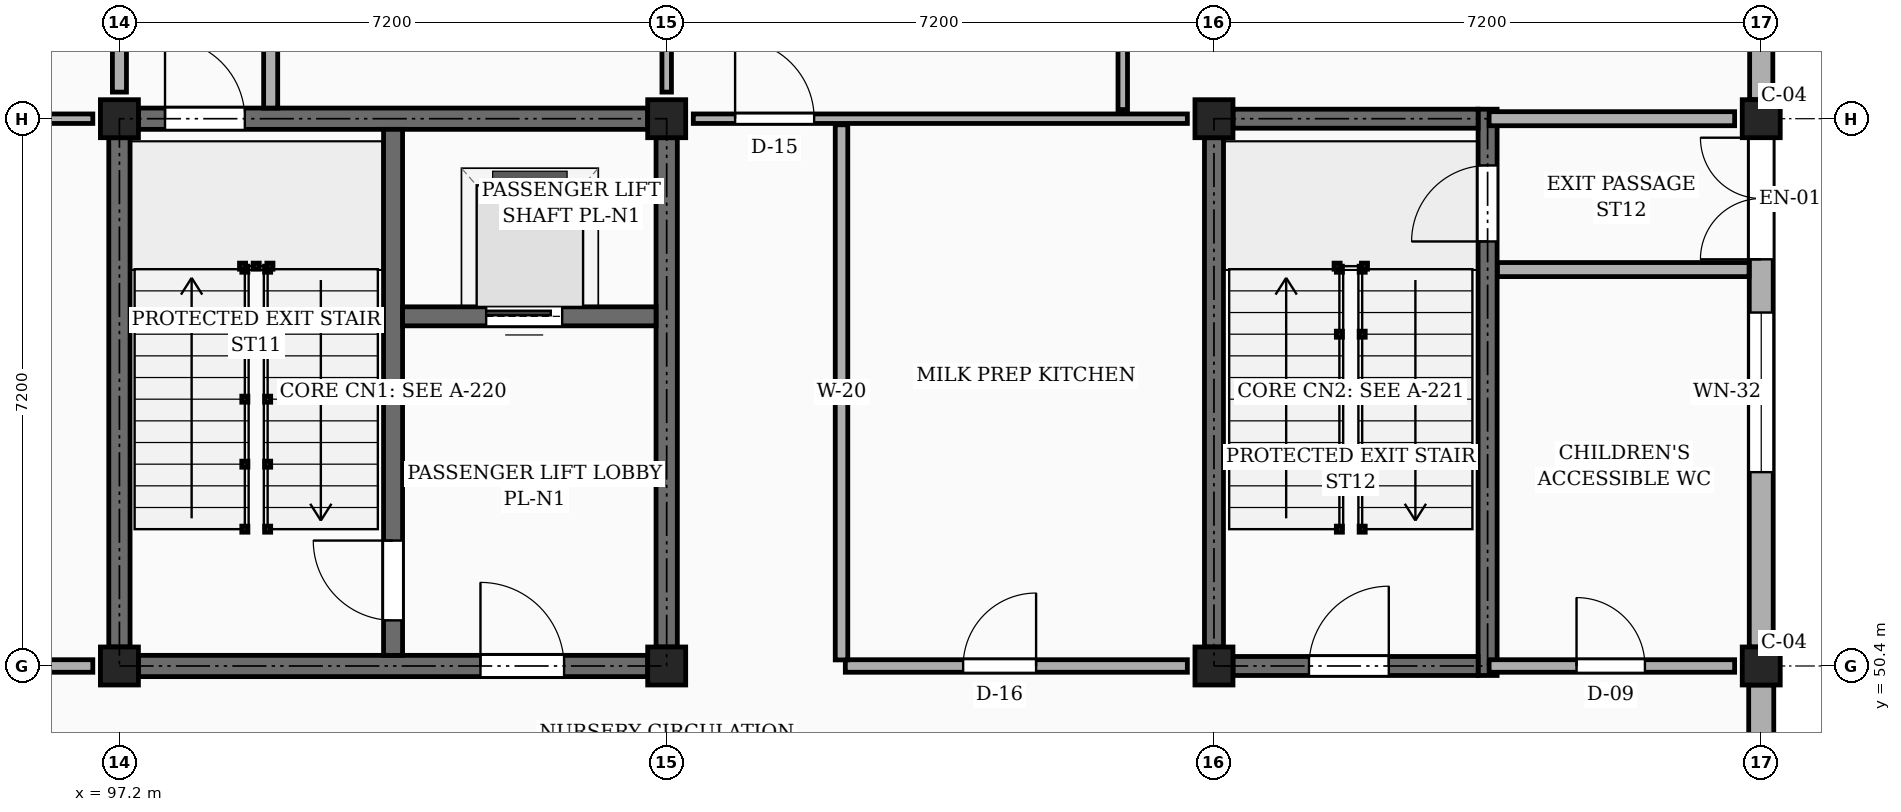
"""IFC4 building model, lengths in metres.
Left out: names, types, materials, properties, quantities, classifications, styles, units other than length and angle.
Written with IfcOpenShell. Run it as: python <this file> out.ifc"""

import sys

from ifc_helpers import new_model, si_unit, direction, frame, frame_2d, origin, origin_2d, place, context, subcontext, project, spatial, rectangle, extrude, element, fill, save


model = new_model("IFC4")
c1 = context("Model", 3, precision=1e-05, world=origin(), true_north=direction((0.0, 1.0)))
c2 = subcontext(c1, "Body", "Model", "MODEL_VIEW")
j1 = project(units=[si_unit("LENGTHUNIT", "METRE"), si_unit("PLANEANGLEUNIT", "RADIAN")], contexts=[c1])
p1 = place(None, origin())
s1 = spatial("IfcSite", under=j1, at=p1, CompositionType="ELEMENT")
p2 = place(p1, origin())
s2 = spatial("IfcBuilding", under=s1, at=p2, CompositionType="ELEMENT")
p3 = place(p2, origin())
s3 = spatial("IfcBuildingStorey", under=s2, at=p3, CompositionType="ELEMENT", Elevation=0.0)
for number, where, z_axis, x_axis in (
    (1, (97.2, 50.4, 0.0), (0.0, 0.0, 1.0), (1.0, 0.0, 0.0)),
    (2, (97.2, 57.6, 0.0), (0.0, 0.0, 1.0), (1.0, 0.0, 0.0)),
    (3, (104.4, 50.4, 0.0), (0.0, 0.0, 1.0), (1.0, 0.0, 0.0)),
    (4, (104.4, 57.6, 0.0), (0.0, 0.0, 1.0), (1.0, 0.0, 0.0)),
    (5, (111.6, 50.4, 0.0), (0.0, 0.0, 1.0), (1.0, 0.0, 0.0)),
    (6, (111.6, 57.6, 0.0), (0.0, 0.0, 1.0), (1.0, 0.0, 0.0)),
    (7, (118.8, 50.4, 0.0), (0.0, 0.0, 1.0), (1.0, 0.0, 0.0)),
    (8, (118.8, 57.6, 0.0), (0.0, 0.0, 1.0), (1.0, 0.0, 0.0)),
):
    element("IfcColumn", number, at=place(p3, frame(where, z_axis=z_axis, x_axis=x_axis)), inside=s3, PredefinedType="COLUMN", context=c2, shape_type="SweptSolid", body=[
        extrude(rectangle(XDim=0.5, YDim=0.5, at=origin_2d()), origin(), (0.0, 0.0, 1.0), 4.5),
    ])
p4 = place(p3, frame((118.8, 43.44, 0.0), z_axis=(0.0, 0.0, 1.0), x_axis=(0.0, 1.0, 0.0)))
e9 = element("IfcWall", 9, at=p4, inside=s3, PredefinedType="SOLIDWALL", context=c2, shape_type="SweptSolid", body=[
    extrude(rectangle(XDim=6.71, YDim=0.33, at=frame_2d((3.355, 0.0))), origin(), (0.0, 0.0, 1.0), 3.83),
])
p5 = place(p4, frame((1.375, 0.0, 0.85)))
e10 = element("IfcOpeningElement", 10, at=p5, cuts=e9, PredefinedType="OPENING", context=c2, shape_type="SweptSolid", body=[
    extrude(rectangle(XDim=1.8, YDim=2.1, at=frame_2d((0.9, 1.05))), frame((0.0, 0.175, 0.0), z_axis=(0.0, -1.0, 0.0), x_axis=(1.0, 0.0, 0.0)), (0.0, 0.0, 1.0), 0.35),
])
p6 = place(p3, frame((118.8, 50.65, 0.0), z_axis=(0.0, 0.0, 1.0), x_axis=(0.0, 1.0, 0.0)))
e11 = element("IfcWall", 11, at=p6, inside=s3, PredefinedType="SOLIDWALL", context=c2, shape_type="SweptSolid", body=[
    extrude(rectangle(XDim=6.7, YDim=0.315, at=frame_2d((3.35, 0.0))), origin(), (0.0, 0.0, 1.0), 3.83),
])
p7 = place(p6, frame((2.3, 0.0, 0.85)))
e12 = element("IfcOpeningElement", 12, at=p7, cuts=e11, PredefinedType="OPENING", context=c2, shape_type="SweptSolid", body=[
    extrude(rectangle(XDim=2.1, YDim=2.1, at=frame_2d((1.05, 1.05))), frame((0.0, 0.167, 0.0), z_axis=(0.0, -1.0, 0.0), x_axis=(1.0, 0.0, 0.0)), (0.0, 0.0, 1.0), 0.335),
])
p8 = place(p6, frame((5.1, 0.0, 0.0)))
e13 = element("IfcOpeningElement", 13, at=p8, cuts=e11, PredefinedType="OPENING", context=c2, shape_type="SweptSolid", body=[
    extrude(rectangle(XDim=1.6, YDim=2.25, at=frame_2d((0.8, 1.125))), frame((0.0, 0.167, 0.0), z_axis=(0.0, -1.0, 0.0), x_axis=(1.0, 0.0, 0.0)), (0.0, 0.0, 1.0), 0.335),
])
p9 = place(p3, frame((118.8, 57.85, 0.0), z_axis=(0.0, 0.0, 1.0), x_axis=(0.0, 1.0, 0.0)))
e14 = element("IfcWall", 14, at=p9, inside=s3, PredefinedType="SOLIDWALL", context=c2, shape_type="SweptSolid", body=[
    extrude(rectangle(XDim=6.71, YDim=0.305, at=frame_2d((3.355, 0.0))), origin(), (0.0, 0.0, 1.0), 3.83),
])
p10 = place(p9, frame((2.455, 0.0, 0.85)))
e15 = element("IfcOpeningElement", 15, at=p10, cuts=e14, PredefinedType="OPENING", context=c2, shape_type="SweptSolid", body=[
    extrude(rectangle(XDim=1.8, YDim=2.1, at=frame_2d((0.9, 1.05))), frame((0.0, 0.163, 0.0), z_axis=(0.0, -1.0, 0.0), x_axis=(1.0, 0.0, 0.0)), (0.0, 0.0, 1.0), 0.325),
])
p11 = place(p3, frame((97.2, 50.65, 0.0), z_axis=(0.0, 0.0, 1.0), x_axis=(0.0, 1.0, 0.0)))
e16 = element("IfcWall", 16, at=p11, inside=s3, PredefinedType="SHEAR", context=c2, shape_type="SweptSolid", body=[
    extrude(rectangle(XDim=6.7, YDim=0.28, at=frame_2d((3.35, 0.0))), origin(), (0.0, 0.0, 1.0), 4.26),
])
p12 = place(p3, frame((97.45, 57.6, 0.0), z_axis=(0.0, 0.0, 1.0), x_axis=(1.0, 0.0, 0.0)))
e17 = element("IfcWall", 17, at=p12, inside=s3, PredefinedType="SHEAR", context=c2, shape_type="SweptSolid", body=[
    extrude(rectangle(XDim=6.7, YDim=0.28, at=frame_2d((3.35, 0.0))), origin(), (0.0, 0.0, 1.0), 4.26),
])
p13 = place(p12, frame((0.35, 0.0, 0.0)))
e18 = element("IfcOpeningElement", 18, at=p13, cuts=e17, PredefinedType="OPENING", context=c2, shape_type="SweptSolid", body=[
    extrude(rectangle(XDim=1.05, YDim=2.15, at=frame_2d((0.525, 1.075))), frame((0.0, 0.15, 0.0), z_axis=(0.0, -1.0, 0.0), x_axis=(1.0, 0.0, 0.0)), (0.0, 0.0, 1.0), 0.3),
])
p14 = place(p3, frame((104.4, 50.65, 0.0), z_axis=(0.0, 0.0, 1.0), x_axis=(0.0, 1.0, 0.0)))
e19 = element("IfcWall", 19, at=p14, inside=s3, PredefinedType="SHEAR", context=c2, shape_type="SweptSolid", body=[
    extrude(rectangle(XDim=6.7, YDim=0.28, at=frame_2d((3.35, 0.0))), origin(), (0.0, 0.0, 1.0), 4.26),
])
p15 = place(p3, frame((97.45, 50.4, 0.0), z_axis=(0.0, 0.0, 1.0), x_axis=(1.0, 0.0, 0.0)))
e20 = element("IfcWall", 20, at=p15, inside=s3, PredefinedType="SHEAR", context=c2, shape_type="SweptSolid", body=[
    extrude(rectangle(XDim=6.7, YDim=0.28, at=frame_2d((3.35, 0.0))), origin(), (0.0, 0.0, 1.0), 4.26),
])
p16 = place(p15, frame((4.5, 0.0, 0.0)))
e21 = element("IfcOpeningElement", 21, at=p16, cuts=e20, PredefinedType="OPENING", context=c2, shape_type="SweptSolid", body=[
    extrude(rectangle(XDim=1.1, YDim=2.15, at=frame_2d((0.55, 1.075))), frame((0.0, 0.15, 0.0), z_axis=(0.0, -1.0, 0.0), x_axis=(1.0, 0.0, 0.0)), (0.0, 0.0, 1.0), 0.3),
])
p17 = place(p3, frame((100.8, 50.54, 0.0), z_axis=(0.0, 0.0, 1.0), x_axis=(0.0, 1.0, 0.0)))
e22 = element("IfcWall", 22, at=p17, inside=s3, PredefinedType="SHEAR", context=c2, shape_type="SweptSolid", body=[
    extrude(rectangle(XDim=6.92, YDim=0.25, at=frame_2d((3.46, 0.0))), origin(), (0.0, 0.0, 1.0), 4.26),
])
p18 = place(p17, frame((0.46, 0.0, 0.0)))
e23 = element("IfcOpeningElement", 23, at=p18, cuts=e22, PredefinedType="OPENING", context=c2, shape_type="SweptSolid", body=[
    extrude(rectangle(XDim=1.05, YDim=2.15, at=frame_2d((0.525, 1.075))), frame((0.0, 0.135, 0.0), z_axis=(0.0, -1.0, 0.0), x_axis=(1.0, 0.0, 0.0)), (0.0, 0.0, 1.0), 0.27),
])
p19 = place(p3, frame((100.925, 55.0, 0.0), z_axis=(0.0, 0.0, 1.0), x_axis=(1.0, 0.0, 0.0)))
e24 = element("IfcWall", 24, at=p19, inside=s3, PredefinedType="SHEAR", context=c2, shape_type="SweptSolid", body=[
    extrude(rectangle(XDim=3.335, YDim=0.25, at=frame_2d((1.667, 0.0))), origin(), (0.0, 0.0, 1.0), 4.26),
])
p20 = place(p19, frame((1.1, 0.0, 0.0)))
e25 = element("IfcOpeningElement", 25, at=p20, cuts=e24, PredefinedType="OPENING", context=c2, shape_type="SweptSolid", body=[
    extrude(rectangle(XDim=1.0, YDim=2.2, at=frame_2d((0.5, 1.1))), frame((0.0, 0.135, 0.0), z_axis=(0.0, -1.0, 0.0), x_axis=(1.0, 0.0, 0.0)), (0.0, 0.0, 1.0), 0.27),
])
p21 = place(p3, frame((111.6, 50.65, 0.0), z_axis=(0.0, 0.0, 1.0), x_axis=(0.0, 1.0, 0.0)))
e26 = element("IfcWall", 26, at=p21, inside=s3, PredefinedType="SHEAR", context=c2, shape_type="SweptSolid", body=[
    extrude(rectangle(XDim=6.7, YDim=0.25, at=frame_2d((3.35, 0.0))), origin(), (0.0, 0.0, 1.0), 4.26),
])
p22 = place(p3, frame((115.2, 50.275, 0.0), z_axis=(0.0, 0.0, 1.0), x_axis=(0.0, 1.0, 0.0)))
e27 = element("IfcWall", 27, at=p22, inside=s3, PredefinedType="SHEAR", context=c2, shape_type="SweptSolid", body=[
    extrude(rectangle(XDim=7.45, YDim=0.25, at=frame_2d((3.725, 0.0))), origin(), (0.0, 0.0, 1.0), 4.26),
])
p23 = place(p22, frame((5.71, 0.0, 0.0)))
e28 = element("IfcOpeningElement", 28, at=p23, cuts=e27, PredefinedType="OPENING", context=c2, shape_type="SweptSolid", body=[
    extrude(rectangle(XDim=1.0, YDim=2.15, at=frame_2d((0.5, 1.075))), frame((0.0, 0.135, 0.0), z_axis=(0.0, -1.0, 0.0), x_axis=(1.0, 0.0, 0.0)), (0.0, 0.0, 1.0), 0.27),
])
p24 = place(p3, frame((111.85, 57.6, 0.0), z_axis=(0.0, 0.0, 1.0), x_axis=(1.0, 0.0, 0.0)))
e29 = element("IfcWall", 29, at=p24, inside=s3, PredefinedType="SHEAR", context=c2, shape_type="SweptSolid", body=[
    extrude(rectangle(XDim=3.225, YDim=0.25, at=frame_2d((1.612, 0.0))), origin(), (0.0, 0.0, 1.0), 4.26),
])
p25 = place(p3, frame((111.85, 50.4, 0.0), z_axis=(0.0, 0.0, 1.0), x_axis=(1.0, 0.0, 0.0)))
e30 = element("IfcWall", 30, at=p25, inside=s3, PredefinedType="SHEAR", context=c2, shape_type="SweptSolid", body=[
    extrude(rectangle(XDim=3.225, YDim=0.25, at=frame_2d((1.612, 0.0))), origin(), (0.0, 0.0, 1.0), 4.26),
])
p26 = place(p25, frame((1.0, 0.0, 0.0)))
e31 = element("IfcOpeningElement", 31, at=p26, cuts=e30, PredefinedType="OPENING", context=c2, shape_type="SweptSolid", body=[
    extrude(rectangle(XDim=1.05, YDim=2.15, at=frame_2d((0.525, 1.075))), frame((0.0, 0.135, 0.0), z_axis=(0.0, -1.0, 0.0), x_axis=(1.0, 0.0, 0.0)), (0.0, 0.0, 1.0), 0.27),
])
p27 = place(p3, frame((90.35, 50.4, 0.0), z_axis=(0.0, 0.0, 1.0), x_axis=(1.0, 0.0, 0.0)))
e32 = element("IfcWall", 32, at=p27, inside=s3, PredefinedType="PARTITIONING", context=c2, shape_type="SweptSolid", body=[
    extrude(rectangle(XDim=6.5, YDim=0.165, at=frame_2d((3.25, 0.0))), origin(), (0.0, 0.0, 1.0), 3.41),
])
p28 = place(p27, frame((2.4, 0.0, 0.0)))
e33 = element("IfcOpeningElement", 33, at=p28, cuts=e32, PredefinedType="OPENING", context=c2, shape_type="SweptSolid", body=[
    extrude(rectangle(XDim=0.96, YDim=2.1, at=frame_2d((0.48, 1.05))), frame((0.0, 0.093, 0.0), z_axis=(0.0, -1.0, 0.0), x_axis=(1.0, 0.0, 0.0)), (0.0, 0.0, 1.0), 0.185),
])
p29 = place(p3, frame((106.75, 50.4, 0.0), z_axis=(0.0, 0.0, 1.0), x_axis=(1.0, 0.0, 0.0)))
e34 = element("IfcWall", 34, at=p29, inside=s3, PredefinedType="PARTITIONING", context=c2, shape_type="SweptSolid", body=[
    extrude(rectangle(XDim=4.5, YDim=0.165, at=frame_2d((2.25, 0.0))), origin(), (0.0, 0.0, 1.0), 3.41),
])
p30 = place(p29, frame((1.55, 0.0, 0.0)))
e35 = element("IfcOpeningElement", 35, at=p30, cuts=e34, PredefinedType="OPENING", context=c2, shape_type="SweptSolid", body=[
    extrude(rectangle(XDim=0.96, YDim=2.1, at=frame_2d((0.48, 1.05))), frame((0.0, 0.093, 0.0), z_axis=(0.0, -1.0, 0.0), x_axis=(1.0, 0.0, 0.0)), (0.0, 0.0, 1.0), 0.185),
])
p31 = place(p3, frame((115.22, 50.4, 0.0), z_axis=(0.0, 0.0, 1.0), x_axis=(1.0, 0.0, 0.0)))
e36 = element("IfcWall", 36, at=p31, inside=s3, PredefinedType="PARTITIONING", context=c2, shape_type="SweptSolid", body=[
    extrude(rectangle(XDim=3.23, YDim=0.165, at=frame_2d((1.615, 0.0))), origin(), (0.0, 0.0, 1.0), 3.41),
])
p32 = place(p31, frame((1.15, 0.0, 0.0)))
e37 = element("IfcOpeningElement", 37, at=p32, cuts=e36, PredefinedType="OPENING", context=c2, shape_type="SweptSolid", body=[
    extrude(rectangle(XDim=0.9, YDim=2.05, at=frame_2d((0.45, 1.025))), frame((0.0, 0.093, 0.0), z_axis=(0.0, -1.0, 0.0), x_axis=(1.0, 0.0, 0.0)), (0.0, 0.0, 1.0), 0.185),
])
p33 = place(p3, frame((106.7, 50.48, 0.0), z_axis=(0.0, 0.0, 1.0), x_axis=(0.0, 1.0, 0.0)))
e38 = element("IfcWall", 38, at=p33, inside=s3, PredefinedType="PARTITIONING", context=c2, shape_type="SweptSolid", body=[
    extrude(rectangle(XDim=7.04, YDim=0.165, at=frame_2d((3.52, 0.0))), origin(), (0.0, 0.0, 1.0), 3.41),
])
p34 = place(p3, frame((90.35, 57.6, 0.0), z_axis=(0.0, 0.0, 1.0), x_axis=(1.0, 0.0, 0.0)))
e39 = element("IfcWall", 39, at=p34, inside=s3, PredefinedType="PARTITIONING", context=c2, shape_type="SweptSolid", body=[
    extrude(rectangle(XDim=6.5, YDim=0.125, at=frame_2d((3.25, 0.0))), origin(), (0.0, 0.0, 1.0), 3.41),
])
p35 = place(p34, frame((2.4, 0.0, 0.0)))
e40 = element("IfcOpeningElement", 40, at=p35, cuts=e39, PredefinedType="OPENING", context=c2, shape_type="SweptSolid", body=[
    extrude(rectangle(XDim=0.96, YDim=2.1, at=frame_2d((0.48, 1.05))), frame((0.0, 0.073, 0.0), z_axis=(0.0, -1.0, 0.0), x_axis=(1.0, 0.0, 0.0)), (0.0, 0.0, 1.0), 0.145),
])
p36 = place(p3, frame((104.75, 57.6, 0.0), z_axis=(0.0, 0.0, 1.0), x_axis=(1.0, 0.0, 0.0)))
e41 = element("IfcWall", 41, at=p36, inside=s3, PredefinedType="PARTITIONING", context=c2, shape_type="SweptSolid", body=[
    extrude(rectangle(XDim=6.5, YDim=0.125, at=frame_2d((3.25, 0.0))), origin(), (0.0, 0.0, 1.0), 3.41),
])
p37 = place(p36, frame((0.55, 0.0, 0.0)))
e42 = element("IfcOpeningElement", 42, at=p37, cuts=e41, PredefinedType="OPENING", context=c2, shape_type="SweptSolid", body=[
    extrude(rectangle(XDim=1.04, YDim=2.12, at=frame_2d((0.52, 1.06))), frame((0.0, 0.073, 0.0), z_axis=(0.0, -1.0, 0.0), x_axis=(1.0, 0.0, 0.0)), (0.0, 0.0, 1.0), 0.145),
])
p38 = place(p3, frame((115.22, 57.6, 0.0), z_axis=(0.0, 0.0, 1.0), x_axis=(1.0, 0.0, 0.0)))
e43 = element("IfcWall", 43, at=p38, inside=s3, PredefinedType="PARTITIONING", context=c2, shape_type="SweptSolid", body=[
    extrude(rectangle(XDim=3.23, YDim=0.185, at=frame_2d((1.615, 0.0))), origin(), (0.0, 0.0, 1.0), 3.41),
])
p39 = place(p3, frame((97.2, 57.95, 0.0), z_axis=(0.0, 0.0, 1.0), x_axis=(0.0, 1.0, 0.0)))
e44 = element("IfcWall", 44, at=p39, inside=s3, PredefinedType="PARTITIONING", context=c2, shape_type="SweptSolid", body=[
    extrude(rectangle(XDim=6.5, YDim=0.185, at=frame_2d((3.25, 0.0))), origin(), (0.0, 0.0, 1.0), 3.41),
])
p40 = place(p3, frame((104.4, 57.95, 0.0), z_axis=(0.0, 0.0, 1.0), x_axis=(0.0, 1.0, 0.0)))
e45 = element("IfcWall", 45, at=p40, inside=s3, PredefinedType="PARTITIONING", context=c2, shape_type="SweptSolid", body=[
    extrude(rectangle(XDim=6.5, YDim=0.125, at=frame_2d((3.25, 0.0))), origin(), (0.0, 0.0, 1.0), 3.41),
])
p41 = place(p40, frame((2.4, 0.0, 0.0)))
e46 = element("IfcOpeningElement", 46, at=p41, cuts=e45, PredefinedType="OPENING", context=c2, shape_type="SweptSolid", body=[
    extrude(rectangle(XDim=0.96, YDim=2.1, at=frame_2d((0.48, 1.05))), frame((0.0, 0.073, 0.0), z_axis=(0.0, -1.0, 0.0), x_axis=(1.0, 0.0, 0.0)), (0.0, 0.0, 1.0), 0.145),
])
p42 = place(p3, frame((110.4, 57.72, 0.0), z_axis=(0.0, 0.0, 1.0), x_axis=(0.0, 1.0, 0.0)))
e47 = element("IfcWall", 47, at=p42, inside=s3, PredefinedType="PARTITIONING", context=c2, shape_type="SweptSolid", body=[
    extrude(rectangle(XDim=6.905, YDim=0.125, at=frame_2d((3.453, 0.0))), origin(), (0.0, 0.0, 1.0), 3.41),
])
p43 = place(p42, frame((2.4, 0.0, 0.0)))
e48 = element("IfcOpeningElement", 48, at=p43, cuts=e47, PredefinedType="OPENING", context=c2, shape_type="SweptSolid", body=[
    extrude(rectangle(XDim=0.96, YDim=2.1, at=frame_2d((0.48, 1.05))), frame((0.0, 0.073, 0.0), z_axis=(0.0, -1.0, 0.0), x_axis=(1.0, 0.0, 0.0)), (0.0, 0.0, 1.0), 0.145),
])
p44 = place(p3, frame((99.19, 57.74, 0.0), z_axis=(0.0, 0.0, 1.0), x_axis=(0.0, 1.0, 0.0)))
e49 = element("IfcWall", 49, at=p44, inside=s3, PredefinedType="PARTITIONING", context=c2, shape_type="SweptSolid", body=[
    extrude(rectangle(XDim=6.9, YDim=0.185, at=frame_2d((3.45, 0.0))), origin(), (0.0, 0.0, 1.0), 3.41),
])
p45 = place(p3, frame((115.33, 55.615, 0.0), z_axis=(0.0, 0.0, 1.0), x_axis=(1.0, 0.0, 0.0)))
e50 = element("IfcWall", 50, at=p45, inside=s3, PredefinedType="PARTITIONING", context=c2, shape_type="SweptSolid", body=[
    extrude(rectangle(XDim=3.31, YDim=0.185, at=frame_2d((1.655, 0.0))), origin(), (0.0, 0.0, 1.0), 3.41),
])
p46 = place(p7, origin())
e51 = element("IfcWindow", 51, at=p46, inside=s3, PartitioningType="SINGLE_PANEL", PredefinedType="WINDOW", context=c2, shape_type="SweptSolid", body=[
    extrude(rectangle(XDim=2.1, YDim=2.1, at=frame_2d((1.05, 1.05))), frame((0.0, 0.03, 0.0), z_axis=(0.0, -1.0, 0.0), x_axis=(1.0, 0.0, 0.0)), (0.0, 0.0, 1.0), 0.06),
])
fill(e12, e51)
p47 = place(p16, frame((1.1, 0.0, 0.0), z_axis=(0.0, 0.0, 1.0), x_axis=(-1.0, 0.0, 0.0)))
e52 = element("IfcDoor", 52, at=p47, inside=s3, OperationType="SINGLE_SWING_LEFT", PredefinedType="DOOR", context=c2, shape_type="SweptSolid", body=[
    extrude(rectangle(XDim=1.1, YDim=2.15, at=frame_2d((0.55, 1.075))), frame((0.0, 0.025, 0.0), z_axis=(0.0, -1.0, 0.0), x_axis=(1.0, 0.0, 0.0)), (0.0, 0.0, 1.0), 0.05),
])
fill(e21, e52)
p48 = place(p18, frame((1.05, 0.0, 0.0), z_axis=(0.0, 0.0, 1.0), x_axis=(-1.0, 0.0, 0.0)))
e53 = element("IfcDoor", 53, at=p48, inside=s3, OperationType="SINGLE_SWING_RIGHT", PredefinedType="DOOR", context=c2, shape_type="SweptSolid", body=[
    extrude(rectangle(XDim=1.05, YDim=2.15, at=frame_2d((0.525, 1.075))), frame((0.0, 0.025, 0.0), z_axis=(0.0, -1.0, 0.0), x_axis=(1.0, 0.0, 0.0)), (0.0, 0.0, 1.0), 0.05),
])
fill(e23, e53)
p49 = place(p20, origin())
e54 = element("IfcDoor", 54, at=p49, inside=s3, OperationType="SLIDING_TO_LEFT", PredefinedType="DOOR", context=c2, shape_type="SweptSolid", body=[
    extrude(rectangle(XDim=1.0, YDim=2.2, at=frame_2d((0.5, 1.1))), frame((0.0, 0.025, 0.0), z_axis=(0.0, -1.0, 0.0), x_axis=(1.0, 0.0, 0.0)), (0.0, 0.0, 1.0), 0.05),
])
fill(e25, e54)
p50 = place(p26, frame((1.05, 0.0, 0.0), z_axis=(0.0, 0.0, 1.0), x_axis=(-1.0, 0.0, 0.0)))
e55 = element("IfcDoor", 55, at=p50, inside=s3, OperationType="SINGLE_SWING_RIGHT", PredefinedType="DOOR", context=c2, shape_type="SweptSolid", body=[
    extrude(rectangle(XDim=1.05, YDim=2.15, at=frame_2d((0.525, 1.075))), frame((0.0, 0.025, 0.0), z_axis=(0.0, -1.0, 0.0), x_axis=(1.0, 0.0, 0.0)), (0.0, 0.0, 1.0), 0.05),
])
fill(e31, e55)
p51 = place(p30, origin())
e56 = element("IfcDoor", 56, at=p51, inside=s3, OperationType="SINGLE_SWING_RIGHT", PredefinedType="DOOR", context=c2, shape_type="SweptSolid", body=[
    extrude(rectangle(XDim=0.96, YDim=2.1, at=frame_2d((0.48, 1.05))), frame((0.0, 0.025, 0.0), z_axis=(0.0, -1.0, 0.0), x_axis=(1.0, 0.0, 0.0)), (0.0, 0.0, 1.0), 0.05),
])
fill(e35, e56)
p52 = place(p32, origin())
e57 = element("IfcDoor", 57, at=p52, inside=s3, OperationType="SINGLE_SWING_LEFT", PredefinedType="DOOR", context=c2, shape_type="SweptSolid", body=[
    extrude(rectangle(XDim=0.9, YDim=2.05, at=frame_2d((0.45, 1.025))), frame((0.0, 0.025, 0.0), z_axis=(0.0, -1.0, 0.0), x_axis=(1.0, 0.0, 0.0)), (0.0, 0.0, 1.0), 0.05),
])
fill(e37, e57)
p53 = place(p37, origin())
e58 = element("IfcDoor", 58, at=p53, inside=s3, OperationType="SINGLE_SWING_LEFT", PredefinedType="DOOR", context=c2, shape_type="SweptSolid", body=[
    extrude(rectangle(XDim=1.04, YDim=2.12, at=frame_2d((0.52, 1.06))), frame((0.0, 0.025, 0.0), z_axis=(0.0, -1.0, 0.0), x_axis=(1.0, 0.0, 0.0)), (0.0, 0.0, 1.0), 0.05),
])
fill(e42, e58)
p54 = place(p13, origin())
e59 = element("IfcDoor", 59, at=p54, inside=s3, OperationType="SINGLE_SWING_LEFT", PredefinedType="DOOR", context=c2, shape_type="SweptSolid", body=[
    extrude(rectangle(XDim=1.05, YDim=2.15, at=frame_2d((0.525, 1.075))), frame((0.0, 0.025, 0.0), z_axis=(0.0, -1.0, 0.0), x_axis=(1.0, 0.0, 0.0)), (0.0, 0.0, 1.0), 0.05),
])
fill(e18, e59)
p55 = place(p23, frame((1.0, 0.0, 0.0), z_axis=(0.0, 0.0, 1.0), x_axis=(-1.0, 0.0, 0.0)))
e60 = element("IfcDoor", 60, at=p55, inside=s3, OperationType="SINGLE_SWING_LEFT", PredefinedType="DOOR", context=c2, shape_type="SweptSolid", body=[
    extrude(rectangle(XDim=1.0, YDim=2.15, at=frame_2d((0.5, 1.075))), frame((0.0, 0.025, 0.0), z_axis=(0.0, -1.0, 0.0), x_axis=(1.0, 0.0, 0.0)), (0.0, 0.0, 1.0), 0.05),
])
fill(e28, e60)
p56 = place(p8, frame((1.6, 0.0, 0.0), z_axis=(0.0, 0.0, 1.0), x_axis=(-1.0, 0.0, 0.0)))
e61 = element("IfcDoor", 61, at=p56, inside=s3, OperationType="DOUBLE_DOOR_SINGLE_SWING", PredefinedType="DOOR", context=c2, shape_type="SweptSolid", body=[
    extrude(rectangle(XDim=1.6, YDim=2.25, at=frame_2d((0.8, 1.125))), frame((0.0, 0.025, 0.0), z_axis=(0.0, -1.0, 0.0), x_axis=(1.0, 0.0, 0.0)), (0.0, 0.0, 1.0), 0.05),
])
fill(e13, e61)
save(model, sys.argv[1])
